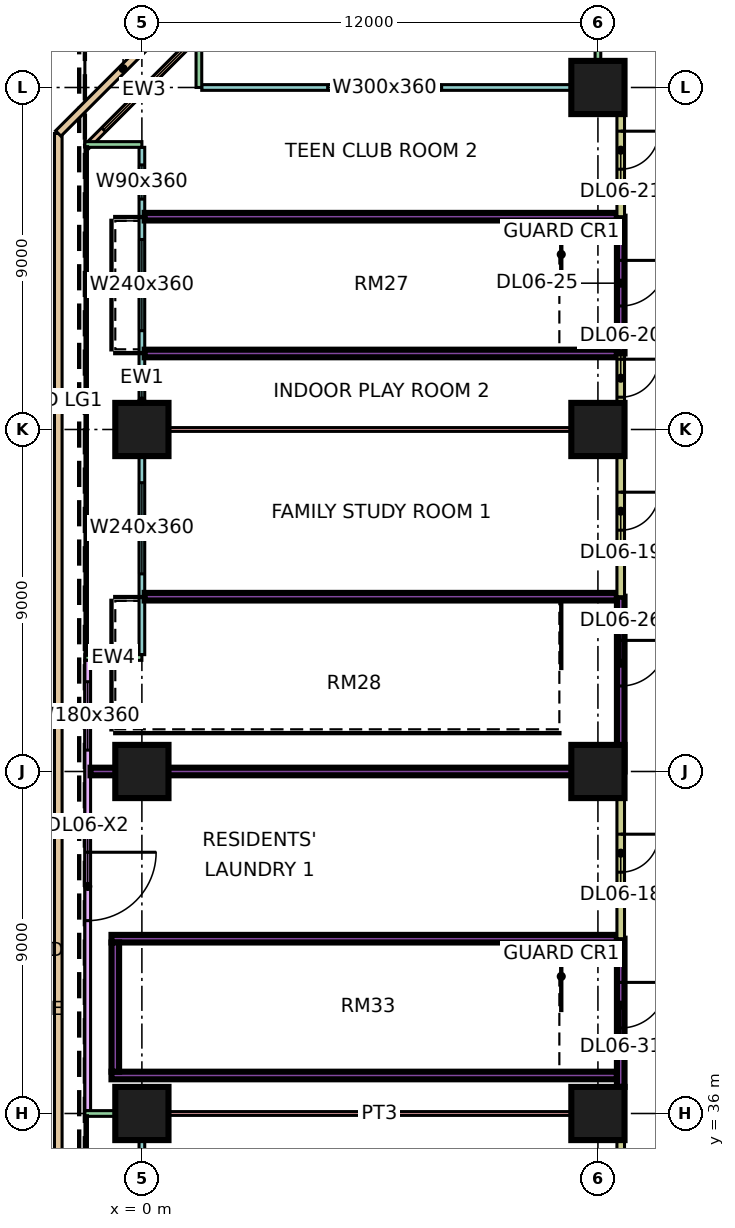
"""IFC4 building model, lengths in metres.
Left out: names, types, materials, properties, quantities, classifications, styles, units other than length and angle.
Written with IfcOpenShell. Run it as: python <this file> out.ifc"""

import sys

from ifc_helpers import new_model, si_unit, direction, frame, frame_2d, origin, origin_2d, place, context, subcontext, project, spatial, rectangle, extrude, element, fill, save


model = new_model("IFC4")
c1 = context("Model", 3, precision=1e-05, world=origin(), true_north=direction((0.0, 1.0)))
c2 = subcontext(c1, "Body", "Model", "MODEL_VIEW")
j1 = project(units=[si_unit("LENGTHUNIT", "METRE"), si_unit("PLANEANGLEUNIT", "RADIAN")], contexts=[c1])
p1 = place(None, origin())
s1 = spatial("IfcSite", under=j1, at=p1, CompositionType="ELEMENT")
p2 = place(p1, origin())
s2 = spatial("IfcBuilding", under=s1, at=p2, CompositionType="ELEMENT")
p3 = place(p2, frame((0.0, 0.0, 35.4)))
s3 = spatial("IfcBuildingStorey", under=s2, at=p3, CompositionType="ELEMENT", Elevation=35.4)
p4 = place(p3, frame((0.0, 36.0, 0.0), z_axis=(0.0, 0.0, 1.0), x_axis=(1.0, 0.0, 0.0)))
e1 = element("IfcColumn", 1, at=p4, inside=s3, PredefinedType="COLUMN", context=c2, shape_type="SweptSolid", body=[
    extrude(rectangle(XDim=1.4, YDim=1.4, at=origin_2d()), origin(), (0.0, 0.0, 1.0), 6.0),
])
for number, where, z_axis, x_axis in (
    (2, (0.0, 45.0, 0.0), (0.0, 0.0, 1.0), (1.0, 0.0, 0.0)),
    (3, (0.0, 54.0, 0.0), (0.0, 0.0, 1.0), (1.0, 0.0, 0.0)),
    (4, (12.0, 36.0, 0.0), (0.0, 0.0, 1.0), (1.0, 0.0, 0.0)),
    (5, (12.0, 45.0, 0.0), (0.0, 0.0, 1.0), (1.0, 0.0, 0.0)),
    (6, (12.0, 54.0, 0.0), (0.0, 0.0, 1.0), (1.0, 0.0, 0.0)),
):
    element("IfcColumn", number, at=place(p3, frame(where, z_axis=z_axis, x_axis=x_axis)), inside=s3, PredefinedType="COLUMN", context=c2, shape_type="SweptSolid", body=[
        extrude(rectangle(XDim=1.4, YDim=1.4, at=origin_2d()), origin(), (0.0, 0.0, 1.0), 6.0),
    ])
p5 = place(p3, frame((12.0, 63.0, 0.0), z_axis=(0.0, 0.0, 1.0), x_axis=(1.0, 0.0, 0.0)))
e7 = element("IfcColumn", 7, at=p5, inside=s3, PredefinedType="COLUMN", context=c2, shape_type="SweptSolid", body=[
    extrude(rectangle(XDim=1.4, YDim=1.4, at=origin_2d()), origin(), (0.0, 0.0, 1.0), 6.0),
])
p6 = place(p3, frame((11.925, 63.0, 0.0), z_axis=(0.0, 0.0, 1.0), x_axis=(-1.0, 0.0, 0.0)))
e8 = element("IfcWall", 8, at=p6, inside=s3, PredefinedType="SOLIDWALL", context=c2, shape_type="SweptSolid", body=[
    extrude(rectangle(XDim=10.35, YDim=0.15, at=frame_2d((5.175, 0.0))), origin(), (0.0, 0.0, 1.0), 5.6),
])
p7 = place(p6, frame((4.038, 0.0, 0.45)))
e9 = element("IfcOpeningElement", 9, at=p7, cuts=e8, PredefinedType="OPENING", context=c2, shape_type="SweptSolid", body=[
    extrude(rectangle(XDim=3.0, YDim=3.6, at=frame_2d((1.5, 1.8))), frame((0.0, 0.085, 0.0), z_axis=(0.0, -1.0, 0.0), x_axis=(1.0, 0.0, 0.0)), (0.0, 0.0, 1.0), 0.17),
])
for number, where, z_axis, x_axis in (
    (10, (12.0, 64.5, 0.0), (0.0, 0.0, 1.0), (0.0, -1.0, 0.0)),
    (11, (1.5, 64.5, 0.0), (0.0, 0.0, 1.0), (0.0, -1.0, 0.0)),
):
    element("IfcWall", number, at=place(p3, frame(where, z_axis=z_axis, x_axis=x_axis)), inside=s3, PredefinedType="SOLIDWALL", context=c2, shape_type="SweptSolid", body=[
        extrude(rectangle(XDim=1.5, YDim=0.15, at=frame_2d((0.75, 0.0))), origin(), (0.0, 0.0, 1.0), 5.6),
    ])
p8 = place(p3, frame((1.553, 64.447, 0.0), z_axis=(0.0, 0.0, 1.0), x_axis=(-0.707106781187, -0.707106781187, 0.0)))
e12 = element("IfcWall", 12, at=p8, inside=s3, PredefinedType="SOLIDWALL", context=c2, shape_type="SweptSolid", body=[
    extrude(rectangle(XDim=4.243, YDim=0.15, at=frame_2d((2.121, 0.0))), origin(), (0.0, 0.0, 1.0), 5.6),
])
p9 = place(p8, frame((0.621, 0.0, 0.45)))
e13 = element("IfcOpeningElement", 13, at=p9, cuts=e12, PredefinedType="OPENING", context=c2, shape_type="SweptSolid", body=[
    extrude(rectangle(XDim=3.0, YDim=3.6, at=frame_2d((1.5, 1.8))), frame((0.0, 0.085, 0.0), z_axis=(0.0, -1.0, 0.0), x_axis=(1.0, 0.0, 0.0)), (0.0, 0.0, 1.0), 0.17),
])
p10 = place(p3, frame((0.0, 61.425, 0.0), z_axis=(0.0, 0.0, 1.0), x_axis=(0.0, -1.0, 0.0)))
e14 = element("IfcWall", 14, at=p10, inside=s3, PredefinedType="SOLIDWALL", context=c2, shape_type="SweptSolid", body=[
    extrude(rectangle(XDim=13.35, YDim=0.15, at=frame_2d((6.675, 0.0))), origin(), (0.0, 0.0, 1.0), 5.6),
])
p11 = place(p10, frame((0.462, 0.0, 0.45)))
e15 = element("IfcOpeningElement", 15, at=p11, cuts=e14, PredefinedType="OPENING", context=c2, shape_type="SweptSolid", body=[
    extrude(rectangle(XDim=0.9, YDim=3.6, at=frame_2d((0.45, 1.8))), frame((0.0, 0.085, 0.0), z_axis=(0.0, -1.0, 0.0), x_axis=(1.0, 0.0, 0.0)), (0.0, 0.0, 1.0), 0.17),
])
p12 = place(p10, frame((2.425, 0.0, 0.45)))
e16 = element("IfcOpeningElement", 16, at=p12, cuts=e14, PredefinedType="OPENING", context=c2, shape_type="SweptSolid", body=[
    extrude(rectangle(XDim=2.4, YDim=3.6, at=frame_2d((1.2, 1.8))), frame((0.0, 0.085, 0.0), z_axis=(0.0, -1.0, 0.0), x_axis=(1.0, 0.0, 0.0)), (0.0, 0.0, 1.0), 0.17),
])
p13 = place(p10, frame((8.825, 0.0, 0.45)))
e17 = element("IfcOpeningElement", 17, at=p13, cuts=e14, PredefinedType="OPENING", context=c2, shape_type="SweptSolid", body=[
    extrude(rectangle(XDim=2.4, YDim=3.6, at=frame_2d((1.2, 1.8))), frame((0.0, 0.085, 0.0), z_axis=(0.0, -1.0, 0.0), x_axis=(1.0, 0.0, 0.0)), (0.0, 0.0, 1.0), 0.17),
])
for number, where, z_axis, x_axis in (
    (18, (-1.5, 61.5, 0.0), (0.0, 0.0, 1.0), (1.0, 0.0, 0.0)),
    (19, (-1.5, 48.0, 0.0), (0.0, 0.0, 1.0), (1.0, 0.0, 0.0)),
):
    element("IfcWall", number, at=place(p3, frame(where, z_axis=z_axis, x_axis=x_axis)), inside=s3, PredefinedType="SOLIDWALL", context=c2, shape_type="SweptSolid", body=[
        extrude(rectangle(XDim=1.5, YDim=0.15, at=frame_2d((0.75, 0.0))), origin(), (0.0, 0.0, 1.0), 5.6),
    ])
p14 = place(p3, frame((-1.425, 47.925, 0.0), z_axis=(0.0, 0.0, 1.0), x_axis=(0.0, -1.0, 0.0)))
e20 = element("IfcWall", 20, at=p14, inside=s3, PredefinedType="SOLIDWALL", context=c2, shape_type="SweptSolid", body=[
    extrude(rectangle(XDim=11.85, YDim=0.15, at=frame_2d((5.925, 0.0))), origin(), (0.0, 0.0, 1.0), 5.6),
])
p15 = place(p14, frame((0.562, 0.0, 0.45)))
e21 = element("IfcOpeningElement", 21, at=p15, cuts=e20, PredefinedType="OPENING", context=c2, shape_type="SweptSolid", body=[
    extrude(rectangle(XDim=1.8, YDim=3.6, at=frame_2d((0.9, 1.8))), frame((0.0, 0.085, 0.0), z_axis=(0.0, -1.0, 0.0), x_axis=(1.0, 0.0, 0.0)), (0.0, 0.0, 1.0), 0.17),
])
p16 = place(p14, frame((5.05, 0.0, 0.0)))
e22 = element("IfcOpeningElement", 22, at=p16, cuts=e20, PredefinedType="OPENING", context=c2, shape_type="SweptSolid", body=[
    extrude(rectangle(XDim=1.8, YDim=2.4, at=frame_2d((0.9, 1.2))), frame((0.0, 0.085, 0.0), z_axis=(0.0, -1.0, 0.0), x_axis=(1.0, 0.0, 0.0)), (0.0, 0.0, 1.0), 0.17),
])
p17 = place(p3, frame((0.0, 35.925, 0.0), z_axis=(0.0, 0.0, 1.0), x_axis=(0.0, -1.0, 0.0)))
e23 = element("IfcWall", 23, at=p17, inside=s3, PredefinedType="SOLIDWALL", context=c2, shape_type="SweptSolid", body=[
    extrude(rectangle(XDim=11.85, YDim=0.15, at=frame_2d((5.925, 0.0))), origin(), (0.0, 0.0, 1.0), 5.6),
])
p18 = place(p17, frame((2.025, 0.0, 0.45)))
e24 = element("IfcOpeningElement", 24, at=p18, cuts=e23, PredefinedType="OPENING", context=c2, shape_type="SweptSolid", body=[
    extrude(rectangle(XDim=3.0, YDim=3.6, at=frame_2d((1.5, 1.8))), frame((0.0, 0.085, 0.0), z_axis=(0.0, -1.0, 0.0), x_axis=(1.0, 0.0, 0.0)), (0.0, 0.0, 1.0), 0.17),
])
p19 = place(p17, frame((6.925, 0.0, 0.45)))
e25 = element("IfcOpeningElement", 25, at=p19, cuts=e23, PredefinedType="OPENING", context=c2, shape_type="SweptSolid", body=[
    extrude(rectangle(XDim=2.4, YDim=3.6, at=frame_2d((1.2, 1.8))), frame((0.0, 0.085, 0.0), z_axis=(0.0, -1.0, 0.0), x_axis=(1.0, 0.0, 0.0)), (0.0, 0.0, 1.0), 0.17),
])
p20 = place(p3, frame((-1.5, 36.0, 0.0), z_axis=(0.0, 0.0, 1.0), x_axis=(1.0, 0.0, 0.0)))
e26 = element("IfcWall", 26, at=p20, inside=s3, PredefinedType="SOLIDWALL", context=c2, shape_type="SweptSolid", body=[
    extrude(rectangle(XDim=1.5, YDim=0.15, at=frame_2d((0.75, 0.0))), origin(), (0.0, 0.0, 1.0), 5.6),
])
p21 = place(p3, frame((-2.2, 12.21, 0.0), z_axis=(0.0, 0.0, 1.0), x_axis=(0.0, 1.0, 0.0)))
e27 = element("IfcWall", 27, at=p21, inside=s3, PredefinedType="PARAPET", context=c2, shape_type="SweptSolid", body=[
    extrude(rectangle(XDim=49.58, YDim=0.2, at=frame_2d((24.79, 0.0))), origin(), (0.0, 0.0, 1.0), 0.5),
])
p22 = place(p3, frame((-2.2, 61.79, 0.0), z_axis=(0.0, 0.0, 1.0), x_axis=(0.707106781187, 0.707106781187, 0.0)))
e28 = element("IfcWall", 28, at=p22, inside=s3, PredefinedType="PARAPET", context=c2, shape_type="SweptSolid", body=[
    extrude(rectangle(XDim=4.822, YDim=0.2, at=frame_2d((2.411, 0.0))), origin(), (0.0, 0.0, 1.0), 0.5),
])
p23 = place(p3, frame((-1.351, 45.0, 0.0), z_axis=(0.0, 0.0, 1.0), x_axis=(1.0, 0.0, 0.0)))
e29 = element("IfcWall", 29, at=p23, inside=s3, PredefinedType="SOLIDWALL", context=c2, shape_type="SweptSolid", body=[
    extrude(rectangle(XDim=13.851, YDim=0.2, at=frame_2d((6.926, 0.0))), origin(), (0.0, 0.0, 1.0), 5.6),
])
for number, where, z_axis, x_axis in (
    (30, (-0.8, 37.0, 0.0), (0.0, 0.0, 1.0), (1.0, 0.0, 0.0)),
    (31, (-0.8, 40.6, 0.0), (0.0, 0.0, 1.0), (1.0, 0.0, 0.0)),
):
    element("IfcWall", number, at=place(p3, frame(where, z_axis=z_axis, x_axis=x_axis)), inside=s3, PredefinedType="SOLIDWALL", context=c2, shape_type="SweptSolid", body=[
        extrude(rectangle(XDim=13.3, YDim=0.2, at=frame_2d((6.65, 0.0))), origin(), (0.0, 0.0, 1.0), 5.6),
    ])
p24 = place(p3, frame((-0.7, 37.1, 0.0), z_axis=(0.0, 0.0, 1.0), x_axis=(0.0, 1.0, 0.0)))
e32 = element("IfcWall", 32, at=p24, inside=s3, PredefinedType="SOLIDWALL", context=c2, shape_type="SweptSolid", body=[
    extrude(rectangle(XDim=3.4, YDim=0.2, at=frame_2d((1.7, 0.0))), origin(), (0.0, 0.0, 1.0), 5.6),
])
e33 = element("IfcWall", 33, at=p4, inside=s3, PredefinedType="PARTITIONING", context=c2, shape_type="SweptSolid", body=[
    extrude(rectangle(XDim=12.5, YDim=0.1, at=frame_2d((6.25, 0.0))), origin(), (0.0, 0.0, 1.0), 5.6),
])
p25 = place(p3, frame((0.074, 49.6, 0.0), z_axis=(0.0, 0.0, 1.0), x_axis=(1.0, 0.0, 0.0)))
e34 = element("IfcWall", 34, at=p25, inside=s3, PredefinedType="SOLIDWALL", context=c2, shape_type="SweptSolid", body=[
    extrude(rectangle(XDim=12.426, YDim=0.2, at=frame_2d((6.213, 0.0))), origin(), (0.0, 0.0, 1.0), 5.6),
])
p26 = place(p3, frame((0.074, 54.0, 0.0), z_axis=(0.0, 0.0, 1.0), x_axis=(1.0, 0.0, 0.0)))
e35 = element("IfcWall", 35, at=p26, inside=s3, PredefinedType="PARTITIONING", context=c2, shape_type="SweptSolid", body=[
    extrude(rectangle(XDim=12.426, YDim=0.1, at=frame_2d((6.213, 0.0))), origin(), (0.0, 0.0, 1.0), 5.6),
])
for number, where, z_axis, x_axis in (
    (36, (0.074, 56.0, 0.0), (0.0, 0.0, 1.0), (1.0, 0.0, 0.0)),
    (37, (0.074, 59.6, 0.0), (0.0, 0.0, 1.0), (1.0, 0.0, 0.0)),
):
    element("IfcWall", number, at=place(p3, frame(where, z_axis=z_axis, x_axis=x_axis)), inside=s3, PredefinedType="SOLIDWALL", context=c2, shape_type="SweptSolid", body=[
        extrude(rectangle(XDim=12.426, YDim=0.2, at=frame_2d((6.213, 0.0))), origin(), (0.0, 0.0, 1.0), 5.6),
    ])
e38 = element("IfcWall", 38, at=p5, inside=s3, PredefinedType="PARTITIONING", context=c2, shape_type="SweptSolid", body=[
    extrude(rectangle(XDim=0.5, YDim=0.2, at=frame_2d((0.25, 0.0))), origin(), (0.0, 0.0, 1.0), 5.6),
])
p27 = place(p3, frame((12.6, 29.6, 0.0), z_axis=(0.0, 0.0, 1.0), x_axis=(0.0, 1.0, 0.0)))
e39 = element("IfcWall", 39, at=p27, inside=s3, PredefinedType="PARTITIONING", context=c2, shape_type="SweptSolid", body=[
    extrude(rectangle(XDim=7.1, YDim=0.2, at=frame_2d((3.55, 0.0))), origin(), (0.0, 0.0, 1.0), 5.6),
])
p28 = place(p27, frame((2.75, 0.0, 0.0)))
e40 = element("IfcOpeningElement", 40, at=p28, cuts=e39, PredefinedType="OPENING", context=c2, shape_type="SweptSolid", body=[
    extrude(rectangle(XDim=1.0, YDim=2.1, at=frame_2d((0.5, 1.05))), frame((0.0, 0.11, 0.0), z_axis=(0.0, -1.0, 0.0), x_axis=(1.0, 0.0, 0.0)), (0.0, 0.0, 1.0), 0.22),
])
p29 = place(p3, frame((12.6, 36.7, 0.0), z_axis=(0.0, 0.0, 1.0), x_axis=(0.0, 1.0, 0.0)))
e41 = element("IfcWall", 41, at=p29, inside=s3, PredefinedType="SOLIDWALL", context=c2, shape_type="SweptSolid", body=[
    extrude(rectangle(XDim=3.9, YDim=0.2, at=frame_2d((1.95, 0.0))), origin(), (0.0, 0.0, 1.0), 5.6),
])
p30 = place(p29, frame((1.55, 0.0, 0.0)))
e42 = element("IfcOpeningElement", 42, at=p30, cuts=e41, PredefinedType="OPENING", context=c2, shape_type="SweptSolid", body=[
    extrude(rectangle(XDim=1.2, YDim=2.1, at=frame_2d((0.6, 1.05))), frame((0.0, 0.11, 0.0), z_axis=(0.0, -1.0, 0.0), x_axis=(1.0, 0.0, 0.0)), (0.0, 0.0, 1.0), 0.22),
])
p31 = place(p3, frame((12.6, 40.6, 0.0), z_axis=(0.0, 0.0, 1.0), x_axis=(0.0, 1.0, 0.0)))
e43 = element("IfcWall", 43, at=p31, inside=s3, PredefinedType="PARTITIONING", context=c2, shape_type="SweptSolid", body=[
    extrude(rectangle(XDim=4.4, YDim=0.2, at=frame_2d((2.2, 0.0))), origin(), (0.0, 0.0, 1.0), 5.6),
])
p32 = place(p31, frame((1.75, 0.0, 0.0)))
e44 = element("IfcOpeningElement", 44, at=p32, cuts=e43, PredefinedType="OPENING", context=c2, shape_type="SweptSolid", body=[
    extrude(rectangle(XDim=1.0, YDim=2.1, at=frame_2d((0.5, 1.05))), frame((0.0, 0.11, 0.0), z_axis=(0.0, -1.0, 0.0), x_axis=(1.0, 0.0, 0.0)), (0.0, 0.0, 1.0), 0.22),
])
p33 = place(p3, frame((12.6, 45.0, 0.0), z_axis=(0.0, 0.0, 1.0), x_axis=(0.0, 1.0, 0.0)))
e45 = element("IfcWall", 45, at=p33, inside=s3, PredefinedType="SOLIDWALL", context=c2, shape_type="SweptSolid", body=[
    extrude(rectangle(XDim=4.6, YDim=0.2, at=frame_2d((2.3, 0.0))), origin(), (0.0, 0.0, 1.0), 5.6),
])
p34 = place(p33, frame((2.25, 0.0, 0.0)))
e46 = element("IfcOpeningElement", 46, at=p34, cuts=e45, PredefinedType="OPENING", context=c2, shape_type="SweptSolid", body=[
    extrude(rectangle(XDim=1.2, YDim=2.1, at=frame_2d((0.6, 1.05))), frame((0.0, 0.11, 0.0), z_axis=(0.0, -1.0, 0.0), x_axis=(1.0, 0.0, 0.0)), (0.0, 0.0, 1.0), 0.22),
])
p35 = place(p3, frame((12.6, 49.6, 0.0), z_axis=(0.0, 0.0, 1.0), x_axis=(0.0, 1.0, 0.0)))
e47 = element("IfcWall", 47, at=p35, inside=s3, PredefinedType="PARTITIONING", context=c2, shape_type="SweptSolid", body=[
    extrude(rectangle(XDim=6.4, YDim=0.2, at=frame_2d((3.2, 0.0))), origin(), (0.0, 0.0, 1.0), 5.6),
])
p36 = place(p35, frame((1.75, 0.0, 0.0)))
e48 = element("IfcOpeningElement", 48, at=p36, cuts=e47, PredefinedType="OPENING", context=c2, shape_type="SweptSolid", body=[
    extrude(rectangle(XDim=1.0, YDim=2.1, at=frame_2d((0.5, 1.05))), frame((0.0, 0.11, 0.0), z_axis=(0.0, -1.0, 0.0), x_axis=(1.0, 0.0, 0.0)), (0.0, 0.0, 1.0), 0.22),
])
p37 = place(p35, frame((5.25, 0.0, 0.0)))
e49 = element("IfcOpeningElement", 49, at=p37, cuts=e47, PredefinedType="OPENING", context=c2, shape_type="SweptSolid", body=[
    extrude(rectangle(XDim=1.0, YDim=2.1, at=frame_2d((0.5, 1.05))), frame((0.0, 0.11, 0.0), z_axis=(0.0, -1.0, 0.0), x_axis=(1.0, 0.0, 0.0)), (0.0, 0.0, 1.0), 0.22),
])
p38 = place(p3, frame((12.6, 56.0, 0.0), z_axis=(0.0, 0.0, 1.0), x_axis=(0.0, 1.0, 0.0)))
e50 = element("IfcWall", 50, at=p38, inside=s3, PredefinedType="SOLIDWALL", context=c2, shape_type="SweptSolid", body=[
    extrude(rectangle(XDim=3.6, YDim=0.2, at=frame_2d((1.8, 0.0))), origin(), (0.0, 0.0, 1.0), 5.6),
])
p39 = place(p38, frame((1.25, 0.0, 0.0)))
e51 = element("IfcOpeningElement", 51, at=p39, cuts=e50, PredefinedType="OPENING", context=c2, shape_type="SweptSolid", body=[
    extrude(rectangle(XDim=1.2, YDim=2.1, at=frame_2d((0.6, 1.05))), frame((0.0, 0.11, 0.0), z_axis=(0.0, -1.0, 0.0), x_axis=(1.0, 0.0, 0.0)), (0.0, 0.0, 1.0), 0.22),
])
p40 = place(p3, frame((12.6, 59.6, 0.0), z_axis=(0.0, 0.0, 1.0), x_axis=(0.0, 1.0, 0.0)))
e52 = element("IfcWall", 52, at=p40, inside=s3, PredefinedType="PARTITIONING", context=c2, shape_type="SweptSolid", body=[
    extrude(rectangle(XDim=3.5, YDim=0.2, at=frame_2d((1.75, 0.0))), origin(), (0.0, 0.0, 1.0), 5.6),
])
p41 = place(p40, frame((1.25, 0.0, 0.0)))
e53 = element("IfcOpeningElement", 53, at=p41, cuts=e52, PredefinedType="OPENING", context=c2, shape_type="SweptSolid", body=[
    extrude(rectangle(XDim=1.0, YDim=2.1, at=frame_2d((0.5, 1.05))), frame((0.0, 0.11, 0.0), z_axis=(0.0, -1.0, 0.0), x_axis=(1.0, 0.0, 0.0)), (0.0, 0.0, 1.0), 0.22),
])
p42 = place(p7, origin())
e54 = element("IfcWindow", 54, at=p42, inside=s3, PartitioningType="SINGLE_PANEL", PredefinedType="WINDOW", context=c2, shape_type="SweptSolid", body=[
    extrude(rectangle(XDim=3.0, YDim=3.6, at=frame_2d((1.5, 1.8))), frame((0.0, 0.03, 0.0), z_axis=(0.0, -1.0, 0.0), x_axis=(1.0, 0.0, 0.0)), (0.0, 0.0, 1.0), 0.06),
])
fill(e9, e54)
p43 = place(p9, origin())
e55 = element("IfcWindow", 55, at=p43, inside=s3, PartitioningType="SINGLE_PANEL", PredefinedType="WINDOW", context=c2, shape_type="SweptSolid", body=[
    extrude(rectangle(XDim=3.0, YDim=3.6, at=frame_2d((1.5, 1.8))), frame((0.0, 0.03, 0.0), z_axis=(0.0, -1.0, 0.0), x_axis=(1.0, 0.0, 0.0)), (0.0, 0.0, 1.0), 0.06),
])
fill(e13, e55)
p44 = place(p11, origin())
e56 = element("IfcWindow", 56, at=p44, inside=s3, PartitioningType="SINGLE_PANEL", PredefinedType="WINDOW", context=c2, shape_type="SweptSolid", body=[
    extrude(rectangle(XDim=0.9, YDim=3.6, at=frame_2d((0.45, 1.8))), frame((0.0, 0.03, 0.0), z_axis=(0.0, -1.0, 0.0), x_axis=(1.0, 0.0, 0.0)), (0.0, 0.0, 1.0), 0.06),
])
fill(e15, e56)
p45 = place(p12, origin())
e57 = element("IfcWindow", 57, at=p45, inside=s3, PartitioningType="SINGLE_PANEL", PredefinedType="WINDOW", context=c2, shape_type="SweptSolid", body=[
    extrude(rectangle(XDim=2.4, YDim=3.6, at=frame_2d((1.2, 1.8))), frame((0.0, 0.03, 0.0), z_axis=(0.0, -1.0, 0.0), x_axis=(1.0, 0.0, 0.0)), (0.0, 0.0, 1.0), 0.06),
])
fill(e16, e57)
p46 = place(p13, origin())
e58 = element("IfcWindow", 58, at=p46, inside=s3, PartitioningType="SINGLE_PANEL", PredefinedType="WINDOW", context=c2, shape_type="SweptSolid", body=[
    extrude(rectangle(XDim=2.4, YDim=3.6, at=frame_2d((1.2, 1.8))), frame((0.0, 0.03, 0.0), z_axis=(0.0, -1.0, 0.0), x_axis=(1.0, 0.0, 0.0)), (0.0, 0.0, 1.0), 0.06),
])
fill(e17, e58)
p47 = place(p15, origin())
e59 = element("IfcWindow", 59, at=p47, inside=s3, PartitioningType="SINGLE_PANEL", PredefinedType="WINDOW", context=c2, shape_type="SweptSolid", body=[
    extrude(rectangle(XDim=1.8, YDim=3.6, at=frame_2d((0.9, 1.8))), frame((0.0, 0.03, 0.0), z_axis=(0.0, -1.0, 0.0), x_axis=(1.0, 0.0, 0.0)), (0.0, 0.0, 1.0), 0.06),
])
fill(e21, e59)
p48 = place(p16, origin())
e60 = element("IfcDoor", 60, at=p48, inside=s3, OperationType="DOUBLE_DOOR_SINGLE_SWING", PredefinedType="DOOR", context=c2, shape_type="SweptSolid", body=[
    extrude(rectangle(XDim=1.8, YDim=2.4, at=frame_2d((0.9, 1.2))), frame((0.0, 0.025, 0.0), z_axis=(0.0, -1.0, 0.0), x_axis=(1.0, 0.0, 0.0)), (0.0, 0.0, 1.0), 0.05),
])
fill(e22, e60)
p49 = place(p32, origin())
e61 = element("IfcDoor", 61, at=p49, inside=s3, OperationType="SINGLE_SWING_RIGHT", PredefinedType="DOOR", context=c2, shape_type="SweptSolid", body=[
    extrude(rectangle(XDim=1.0, YDim=2.1, at=frame_2d((0.5, 1.05))), frame((0.0, 0.025, 0.0), z_axis=(0.0, -1.0, 0.0), x_axis=(1.0, 0.0, 0.0)), (0.0, 0.0, 1.0), 0.05),
])
fill(e44, e61)
p50 = place(p36, origin())
e62 = element("IfcDoor", 62, at=p50, inside=s3, OperationType="SINGLE_SWING_RIGHT", PredefinedType="DOOR", context=c2, shape_type="SweptSolid", body=[
    extrude(rectangle(XDim=1.0, YDim=2.1, at=frame_2d((0.5, 1.05))), frame((0.0, 0.025, 0.0), z_axis=(0.0, -1.0, 0.0), x_axis=(1.0, 0.0, 0.0)), (0.0, 0.0, 1.0), 0.05),
])
fill(e48, e62)
p51 = place(p37, origin())
e63 = element("IfcDoor", 63, at=p51, inside=s3, OperationType="SINGLE_SWING_RIGHT", PredefinedType="DOOR", context=c2, shape_type="SweptSolid", body=[
    extrude(rectangle(XDim=1.0, YDim=2.1, at=frame_2d((0.5, 1.05))), frame((0.0, 0.025, 0.0), z_axis=(0.0, -1.0, 0.0), x_axis=(1.0, 0.0, 0.0)), (0.0, 0.0, 1.0), 0.05),
])
fill(e49, e63)
p52 = place(p41, origin())
e64 = element("IfcDoor", 64, at=p52, inside=s3, OperationType="SINGLE_SWING_RIGHT", PredefinedType="DOOR", context=c2, shape_type="SweptSolid", body=[
    extrude(rectangle(XDim=1.0, YDim=2.1, at=frame_2d((0.5, 1.05))), frame((0.0, 0.025, 0.0), z_axis=(0.0, -1.0, 0.0), x_axis=(1.0, 0.0, 0.0)), (0.0, 0.0, 1.0), 0.05),
])
fill(e53, e64)
p53 = place(p39, origin())
e65 = element("IfcDoor", 65, at=p53, inside=s3, OperationType="SINGLE_SWING_RIGHT", PredefinedType="DOOR", context=c2, shape_type="SweptSolid", body=[
    extrude(rectangle(XDim=1.2, YDim=2.1, at=frame_2d((0.6, 1.05))), frame((0.0, 0.025, 0.0), z_axis=(0.0, -1.0, 0.0), x_axis=(1.0, 0.0, 0.0)), (0.0, 0.0, 1.0), 0.05),
])
fill(e51, e65)
p54 = place(p34, origin())
e66 = element("IfcDoor", 66, at=p54, inside=s3, OperationType="SINGLE_SWING_RIGHT", PredefinedType="DOOR", context=c2, shape_type="SweptSolid", body=[
    extrude(rectangle(XDim=1.2, YDim=2.1, at=frame_2d((0.6, 1.05))), frame((0.0, 0.025, 0.0), z_axis=(0.0, -1.0, 0.0), x_axis=(1.0, 0.0, 0.0)), (0.0, 0.0, 1.0), 0.05),
])
fill(e46, e66)
p55 = place(p30, origin())
e67 = element("IfcDoor", 67, at=p55, inside=s3, OperationType="SINGLE_SWING_RIGHT", PredefinedType="DOOR", context=c2, shape_type="SweptSolid", body=[
    extrude(rectangle(XDim=1.2, YDim=2.1, at=frame_2d((0.6, 1.05))), frame((0.0, 0.025, 0.0), z_axis=(0.0, -1.0, 0.0), x_axis=(1.0, 0.0, 0.0)), (0.0, 0.0, 1.0), 0.05),
])
fill(e42, e67)
save(model, sys.argv[1])
